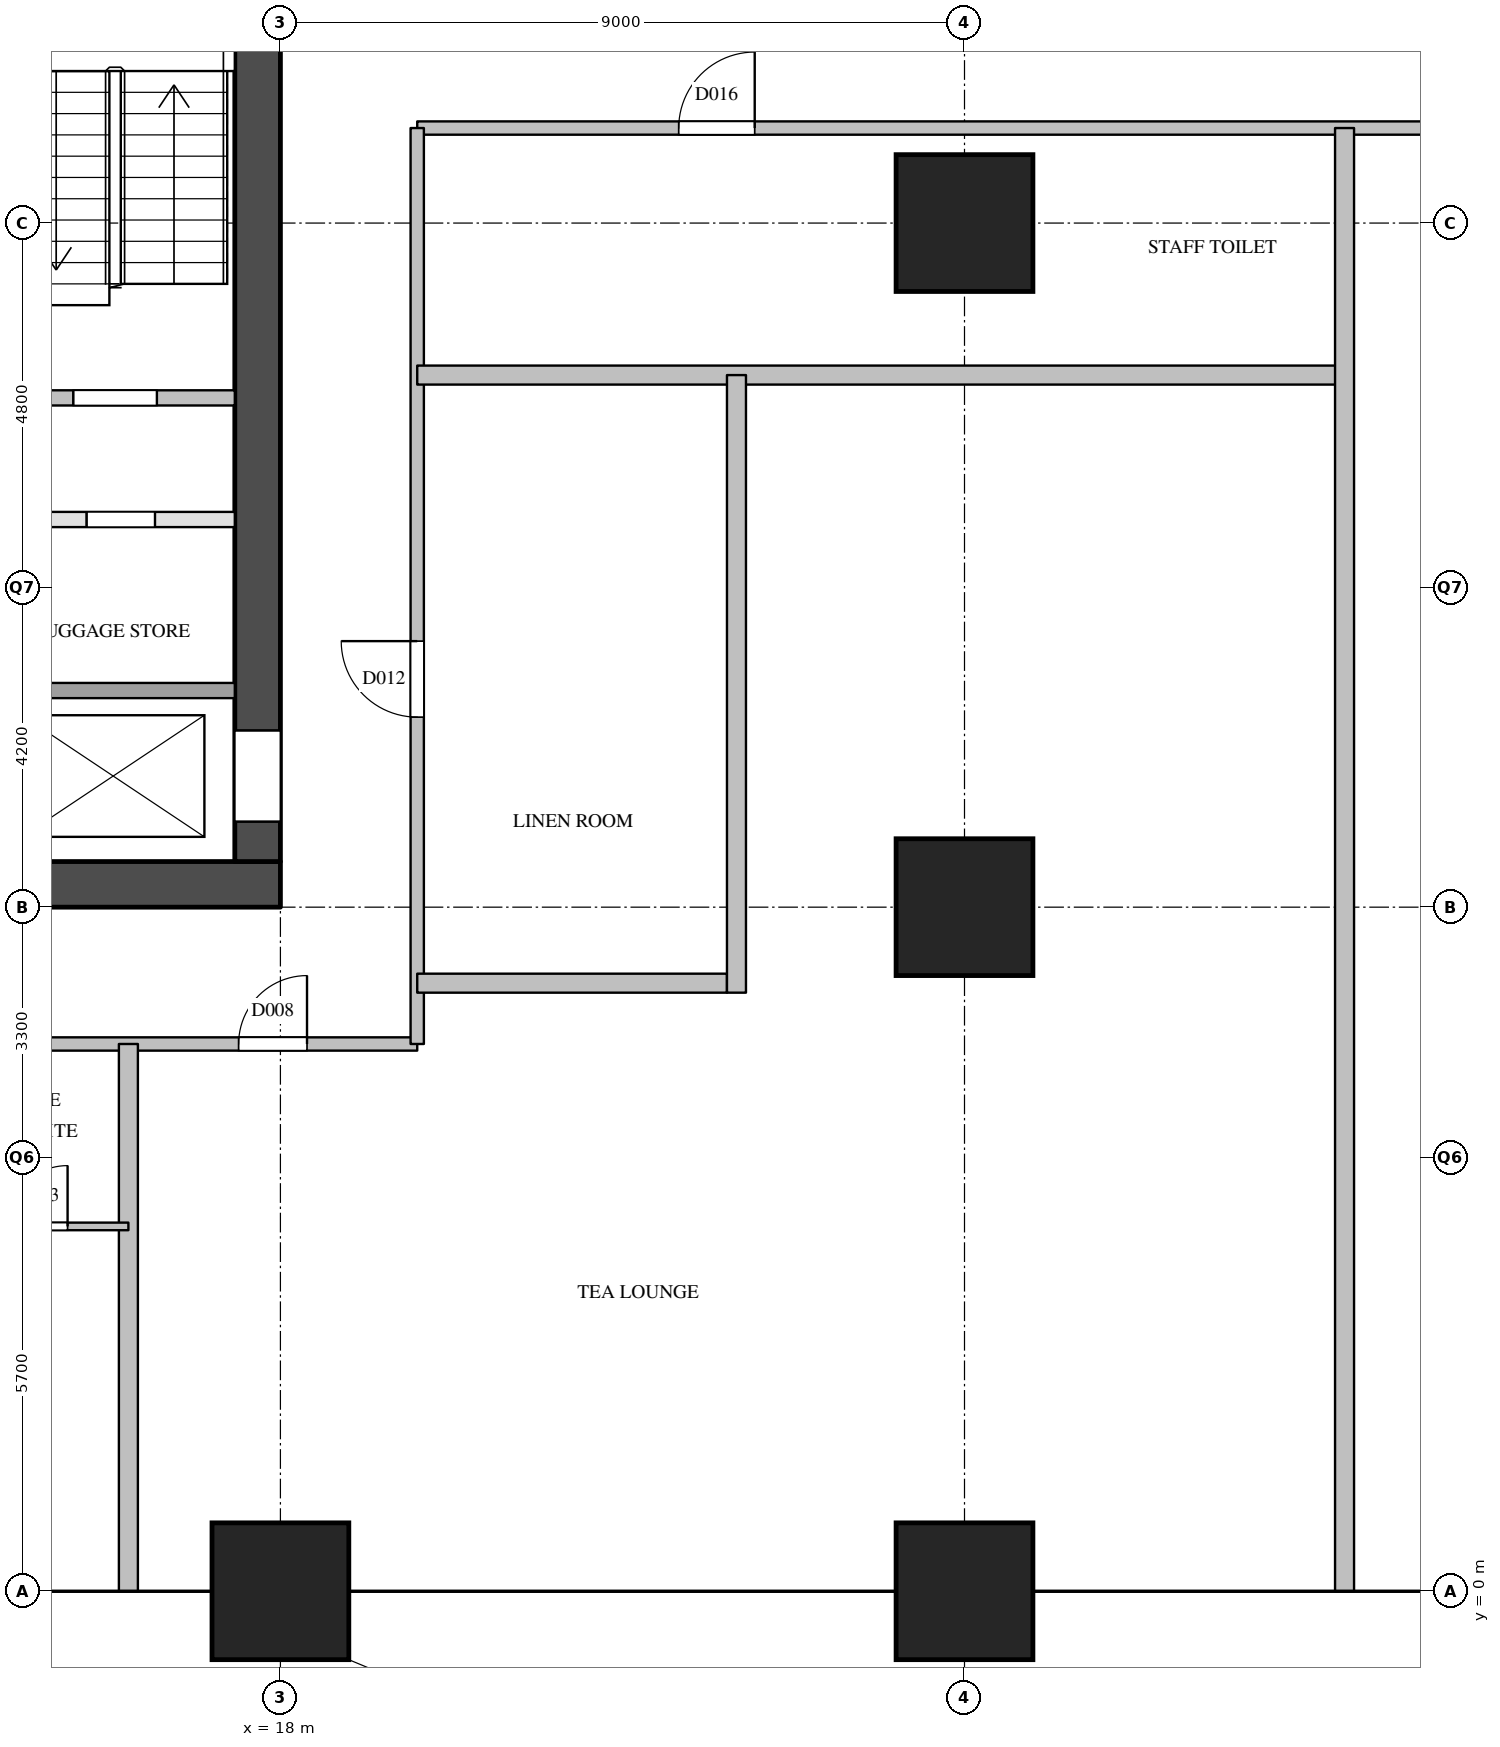
"""IFC4 building model, lengths in metres.
Left out: names, types, materials, properties, quantities, classifications, styles, units other than length and angle.
Written with IfcOpenShell. Run it as: python <this file> out.ifc"""

import sys

from ifc_helpers import new_model, si_unit, direction, frame, frame_2d, origin, origin_2d, place, context, subcontext, project, spatial, rectangle, extrude, element, fill, save


model = new_model("IFC4")
c1 = context("Model", 3, precision=1e-05, world=origin(), true_north=direction((0.0, 1.0)))
c2 = subcontext(c1, "Body", "Model", "MODEL_VIEW")
j1 = project(units=[si_unit("LENGTHUNIT", "METRE"), si_unit("PLANEANGLEUNIT", "RADIAN")], contexts=[c1])
p1 = place(None, origin())
s1 = spatial("IfcSite", under=j1, at=p1, CompositionType="ELEMENT")
p2 = place(p1, origin())
s2 = spatial("IfcBuilding", under=s1, at=p2, CompositionType="ELEMENT")
p3 = place(p2, frame((0.0, 0.0, 34.8)))
s3 = spatial("IfcBuildingStorey", under=s2, at=p3, CompositionType="ELEMENT", Elevation=34.8)
for number, where, z_axis, x_axis in (
    (1, (18.0, 0.0, 0.0), (0.0, 0.0, 1.0), (1.0, 0.0, 0.0)),
    (2, (27.0, 0.0, 0.0), (0.0, 0.0, 1.0), (1.0, 0.0, 0.0)),
    (3, (27.0, 9.0, 0.0), (0.0, 0.0, 1.0), (1.0, 0.0, 0.0)),
    (4, (27.0, 18.0, 0.0), (0.0, 0.0, 1.0), (1.0, 0.0, 0.0)),
):
    element("IfcColumn", number, at=place(p3, frame(where, z_axis=z_axis, x_axis=x_axis)), inside=s3, PredefinedType="COLUMN", context=c2, shape_type="SweptSolid", body=[
        extrude(rectangle(XDim=1.8, YDim=1.8, at=origin_2d()), origin(), (0.0, 0.0, 1.0), 3.8),
    ])
p4 = place(p3, frame((9.0, 9.3, 0.0), z_axis=(0.0, 0.0, 1.0), x_axis=(1.0, 0.0, 0.0)))
e5 = element("IfcWall", 5, at=p4, inside=s3, PredefinedType="SHEAR", context=c2, shape_type="SweptSolid", body=[
    extrude(rectangle(XDim=9.0, YDim=0.6, at=frame_2d((4.5, 0.0))), origin(), (0.0, 0.0, 1.0), 3.5),
])
p5 = place(p3, frame((17.7, 9.6, 0.0), z_axis=(0.0, 0.0, 1.0), x_axis=(0.0, 1.0, 0.0)))
e6 = element("IfcWall", 6, at=p5, inside=s3, PredefinedType="SHEAR", context=c2, shape_type="SweptSolid", body=[
    extrude(rectangle(XDim=12.3, YDim=0.6, at=frame_2d((6.15, 0.0))), origin(), (0.0, 0.0, 1.0), 3.5),
])
p6 = place(p5, frame((0.525, 0.0, 0.0)))
e7 = element("IfcOpeningElement", 7, at=p6, cuts=e6, PredefinedType="OPENING", context=c2, shape_type="SweptSolid", body=[
    extrude(rectangle(XDim=1.2, YDim=2.1, at=frame_2d((0.6, 1.05))), frame((0.0, 0.31, 0.0), z_axis=(0.0, -1.0, 0.0), x_axis=(1.0, 0.0, 0.0)), (0.0, 0.0, 1.0), 0.62),
])
p7 = place(p3, frame((9.6, 11.85, 0.0), z_axis=(0.0, 0.0, 1.0), x_axis=(1.0, 0.0, 0.0)))
e8 = element("IfcWall", 8, at=p7, inside=s3, PredefinedType="SOLIDWALL", context=c2, shape_type="SweptSolid", body=[
    extrude(rectangle(XDim=7.8, YDim=0.2, at=frame_2d((3.9, 0.0))), origin(), (0.0, 0.0, 1.0), 3.5),
])
p8 = place(p3, frame((11.4, 14.1, 0.0), z_axis=(0.0, 0.0, 1.0), x_axis=(1.0, 0.0, 0.0)))
e9 = element("IfcWall", 9, at=p8, inside=s3, PredefinedType="PARTITIONING", context=c2, shape_type="SweptSolid", body=[
    extrude(rectangle(XDim=6.0, YDim=0.2, at=frame_2d((3.0, 0.0))), origin(), (0.0, 0.0, 1.0), 3.5),
])
p9 = place(p8, frame((1.05, 0.0, 0.0)))
e10 = element("IfcOpeningElement", 10, at=p9, cuts=e9, PredefinedType="OPENING", context=c2, shape_type="SweptSolid", body=[
    extrude(rectangle(XDim=0.9, YDim=2.1, at=frame_2d((0.45, 1.05))), frame((0.0, 0.11, 0.0), z_axis=(0.0, -1.0, 0.0), x_axis=(1.0, 0.0, 0.0)), (0.0, 0.0, 1.0), 0.22),
])
p10 = place(p8, frame((4.05, 0.0, 0.0)))
e11 = element("IfcOpeningElement", 11, at=p10, cuts=e9, PredefinedType="OPENING", context=c2, shape_type="SweptSolid", body=[
    extrude(rectangle(XDim=0.9, YDim=2.1, at=frame_2d((0.45, 1.05))), frame((0.0, 0.11, 0.0), z_axis=(0.0, -1.0, 0.0), x_axis=(1.0, 0.0, 0.0)), (0.0, 0.0, 1.0), 0.22),
])
p11 = place(p3, frame((11.1, 15.7, 0.0), z_axis=(0.0, 0.0, 1.0), x_axis=(1.0, 0.0, 0.0)))
e12 = element("IfcWall", 12, at=p11, inside=s3, PredefinedType="SOLIDWALL", context=c2, shape_type="SweptSolid", body=[
    extrude(rectangle(XDim=6.3, YDim=0.2, at=frame_2d((3.15, 0.0))), origin(), (0.0, 0.0, 1.0), 3.5),
])
p12 = place(p11, frame((4.175, 0.0, 0.0)))
e13 = element("IfcOpeningElement", 13, at=p12, cuts=e12, PredefinedType="OPENING", context=c2, shape_type="SweptSolid", body=[
    extrude(rectangle(XDim=1.1, YDim=2.1, at=frame_2d((0.55, 1.05))), frame((0.0, 0.11, 0.0), z_axis=(0.0, -1.0, 0.0), x_axis=(1.0, 0.0, 0.0)), (0.0, 0.0, 1.0), 0.22),
])
p13 = place(p11, frame((1.025, 0.0, 0.0)))
e14 = element("IfcOpeningElement", 14, at=p13, cuts=e12, PredefinedType="OPENING", context=c2, shape_type="SweptSolid", body=[
    extrude(rectangle(XDim=1.1, YDim=2.1, at=frame_2d((0.55, 1.05))), frame((0.0, 0.11, 0.0), z_axis=(0.0, -1.0, 0.0), x_axis=(1.0, 0.0, 0.0)), (0.0, 0.0, 1.0), 0.22),
])
p14 = place(p3, frame((7.2, 7.2, 0.0), z_axis=(0.0, 0.0, 1.0), x_axis=(1.0, 0.0, 0.0)))
e15 = element("IfcWall", 15, at=p14, inside=s3, PredefinedType="PARTITIONING", context=c2, shape_type="SweptSolid", body=[
    extrude(rectangle(XDim=12.6, YDim=0.175, at=frame_2d((6.3, 0.0))), origin(), (0.0, 0.0, 1.0), 3.5),
])
p15 = place(p14, frame((3.1, 0.0, 0.0)))
e16 = element("IfcOpeningElement", 16, at=p15, cuts=e15, PredefinedType="OPENING", context=c2, shape_type="SweptSolid", body=[
    extrude(rectangle(XDim=1.0, YDim=2.1, at=frame_2d((0.5, 1.05))), frame((0.0, 0.097, 0.0), z_axis=(0.0, -1.0, 0.0), x_axis=(1.0, 0.0, 0.0)), (0.0, 0.0, 1.0), 0.195),
])
p16 = place(p14, frame((10.25, 0.0, 0.0)))
e17 = element("IfcOpeningElement", 17, at=p16, cuts=e15, PredefinedType="OPENING", context=c2, shape_type="SweptSolid", body=[
    extrude(rectangle(XDim=0.9, YDim=2.1, at=frame_2d((0.45, 1.05))), frame((0.0, 0.097, 0.0), z_axis=(0.0, -1.0, 0.0), x_axis=(1.0, 0.0, 0.0)), (0.0, 0.0, 1.0), 0.195),
])
p17 = place(p3, frame((19.8, 19.25, 0.0), z_axis=(0.0, 0.0, 1.0), x_axis=(1.0, 0.0, 0.0)))
e18 = element("IfcWall", 18, at=p17, inside=s3, PredefinedType="PARTITIONING", context=c2, shape_type="SweptSolid", body=[
    extrude(rectangle(XDim=14.4, YDim=0.175, at=frame_2d((7.2, 0.0))), origin(), (0.0, 0.0, 1.0), 2.5),
])
p18 = place(p17, frame((3.44, 0.0, 0.0)))
e19 = element("IfcOpeningElement", 19, at=p18, cuts=e18, PredefinedType="OPENING", context=c2, shape_type="SweptSolid", body=[
    extrude(rectangle(XDim=1.0, YDim=2.1, at=frame_2d((0.5, 1.05))), frame((0.0, 0.097, 0.0), z_axis=(0.0, -1.0, 0.0), x_axis=(1.0, 0.0, 0.0)), (0.0, 0.0, 1.0), 0.195),
])
p19 = place(p3, frame((19.8, 7.2, 0.0), z_axis=(0.0, 0.0, 1.0), x_axis=(0.0, 1.0, 0.0)))
e20 = element("IfcWall", 20, at=p19, inside=s3, PredefinedType="PARTITIONING", context=c2, shape_type="SweptSolid", body=[
    extrude(rectangle(XDim=12.05, YDim=0.175, at=frame_2d((6.025, 0.0))), origin(), (0.0, 0.0, 1.0), 3.5),
])
p20 = place(p19, frame((4.3, 0.0, 0.0)))
e21 = element("IfcOpeningElement", 21, at=p20, cuts=e20, PredefinedType="OPENING", context=c2, shape_type="SweptSolid", body=[
    extrude(rectangle(XDim=1.0, YDim=2.1, at=frame_2d((0.5, 1.05))), frame((0.0, 0.097, 0.0), z_axis=(0.0, -1.0, 0.0), x_axis=(1.0, 0.0, 0.0)), (0.0, 0.0, 1.0), 0.195),
])
p21 = place(p3, frame((19.8, 8.0, 0.0), z_axis=(0.0, 0.0, 1.0), x_axis=(1.0, 0.0, 0.0)))
e22 = element("IfcWall", 22, at=p21, inside=s3, PredefinedType="PARTITIONING", context=c2, shape_type="SweptSolid", body=[
    extrude(rectangle(XDim=4.075, YDim=0.25, at=frame_2d((2.038, 0.0))), origin(), (0.0, 0.0, 1.0), 3.5),
])
p22 = place(p3, frame((19.8, 16.0, 0.0), z_axis=(0.0, 0.0, 1.0), x_axis=(1.0, 0.0, 0.0)))
e23 = element("IfcWall", 23, at=p22, inside=s3, PredefinedType="PARTITIONING", context=c2, shape_type="SweptSolid", body=[
    extrude(rectangle(XDim=12.2, YDim=0.25, at=frame_2d((6.1, 0.0))), origin(), (0.0, 0.0, 1.0), 2.5),
])
p23 = place(p3, frame((16.0, 0.0, 0.0), z_axis=(0.0, 0.0, 1.0), x_axis=(0.0, 1.0, 0.0)))
e24 = element("IfcWall", 24, at=p23, inside=s3, PredefinedType="PARTITIONING", context=c2, shape_type="SweptSolid", body=[
    extrude(rectangle(XDim=7.2, YDim=0.25, at=frame_2d((3.6, 0.0))), origin(), (0.0, 0.0, 1.0), 2.5),
])
p24 = place(p3, frame((24.0, 7.875, 0.0), z_axis=(0.0, 0.0, 1.0), x_axis=(0.0, 1.0, 0.0)))
e25 = element("IfcWall", 25, at=p24, inside=s3, PredefinedType="PARTITIONING", context=c2, shape_type="SweptSolid", body=[
    extrude(rectangle(XDim=8.125, YDim=0.25, at=frame_2d((4.062, 0.0))), origin(), (0.0, 0.0, 1.0), 3.5),
])
p25 = place(p3, frame((32.0, 0.0, 0.0), z_axis=(0.0, 0.0, 1.0), x_axis=(0.0, 1.0, 0.0)))
e26 = element("IfcWall", 26, at=p25, inside=s3, PredefinedType="PARTITIONING", context=c2, shape_type="SweptSolid", body=[
    extrude(rectangle(XDim=19.25, YDim=0.25, at=frame_2d((9.625, 0.0))), origin(), (0.0, 0.0, 1.0), 2.5),
])
p26 = place(p3, frame((13.6, 4.8, 0.0), z_axis=(0.0, 0.0, 1.0), x_axis=(1.0, 0.0, 0.0)))
e27 = element("IfcWall", 27, at=p26, inside=s3, PredefinedType="PARTITIONING", context=c2, shape_type="SweptSolid", body=[
    extrude(rectangle(XDim=2.4, YDim=0.1, at=frame_2d((1.2, 0.0))), origin(), (0.0, 0.0, 1.0), 3.5),
])
p27 = place(p26, frame((0.8, 0.0, 0.0)))
e28 = element("IfcOpeningElement", 28, at=p27, cuts=e27, PredefinedType="OPENING", context=c2, shape_type="SweptSolid", body=[
    extrude(rectangle(XDim=0.8, YDim=2.1, at=frame_2d((0.4, 1.05))), frame((0.0, 0.06, 0.0), z_axis=(0.0, -1.0, 0.0), x_axis=(1.0, 0.0, 0.0)), (0.0, 0.0, 1.0), 0.12),
])
p28 = place(p6, origin())
e29 = element("IfcDoor", 29, at=p28, inside=s3, OperationType="SLIDING_TO_LEFT", PredefinedType="DOOR", context=c2, shape_type="SweptSolid", body=[
    extrude(rectangle(XDim=1.2, YDim=2.1, at=frame_2d((0.6, 1.05))), frame((0.0, 0.025, 0.0), z_axis=(0.0, -1.0, 0.0), x_axis=(1.0, 0.0, 0.0)), (0.0, 0.0, 1.0), 0.05),
])
fill(e7, e29)
p29 = place(p12, origin())
e30 = element("IfcDoor", 30, at=p29, inside=s3, OperationType="SINGLE_SWING_RIGHT", PredefinedType="DOOR", context=c2, shape_type="SweptSolid", body=[
    extrude(rectangle(XDim=1.1, YDim=2.1, at=frame_2d((0.55, 1.05))), frame((0.0, 0.025, 0.0), z_axis=(0.0, -1.0, 0.0), x_axis=(1.0, 0.0, 0.0)), (0.0, 0.0, 1.0), 0.05),
])
fill(e13, e30)
p30 = place(p10, origin())
e31 = element("IfcDoor", 31, at=p30, inside=s3, OperationType="SINGLE_SWING_RIGHT", PredefinedType="DOOR", context=c2, shape_type="SweptSolid", body=[
    extrude(rectangle(XDim=0.9, YDim=2.1, at=frame_2d((0.45, 1.05))), frame((0.0, 0.025, 0.0), z_axis=(0.0, -1.0, 0.0), x_axis=(1.0, 0.0, 0.0)), (0.0, 0.0, 1.0), 0.05),
])
fill(e11, e31)
p31 = place(p27, origin())
e32 = element("IfcDoor", 32, at=p31, inside=s3, OperationType="SINGLE_SWING_RIGHT", PredefinedType="DOOR", context=c2, shape_type="SweptSolid", body=[
    extrude(rectangle(XDim=0.8, YDim=2.1, at=frame_2d((0.4, 1.05))), frame((0.0, 0.025, 0.0), z_axis=(0.0, -1.0, 0.0), x_axis=(1.0, 0.0, 0.0)), (0.0, 0.0, 1.0), 0.05),
])
fill(e28, e32)
p32 = place(p16, origin())
e33 = element("IfcDoor", 33, at=p32, inside=s3, OperationType="SINGLE_SWING_RIGHT", PredefinedType="DOOR", context=c2, shape_type="SweptSolid", body=[
    extrude(rectangle(XDim=0.9, YDim=2.1, at=frame_2d((0.45, 1.05))), frame((0.0, 0.025, 0.0), z_axis=(0.0, -1.0, 0.0), x_axis=(1.0, 0.0, 0.0)), (0.0, 0.0, 1.0), 0.05),
])
fill(e17, e33)
p33 = place(p20, origin())
e34 = element("IfcDoor", 34, at=p33, inside=s3, OperationType="SINGLE_SWING_RIGHT", PredefinedType="DOOR", context=c2, shape_type="SweptSolid", body=[
    extrude(rectangle(XDim=1.0, YDim=2.1, at=frame_2d((0.5, 1.05))), frame((0.0, 0.025, 0.0), z_axis=(0.0, -1.0, 0.0), x_axis=(1.0, 0.0, 0.0)), (0.0, 0.0, 1.0), 0.05),
])
fill(e21, e34)
p34 = place(p18, origin())
e35 = element("IfcDoor", 35, at=p34, inside=s3, OperationType="SINGLE_SWING_RIGHT", PredefinedType="DOOR", context=c2, shape_type="SweptSolid", body=[
    extrude(rectangle(XDim=1.0, YDim=2.1, at=frame_2d((0.5, 1.05))), frame((0.0, 0.025, 0.0), z_axis=(0.0, -1.0, 0.0), x_axis=(1.0, 0.0, 0.0)), (0.0, 0.0, 1.0), 0.05),
])
fill(e19, e35)
save(model, sys.argv[1])
